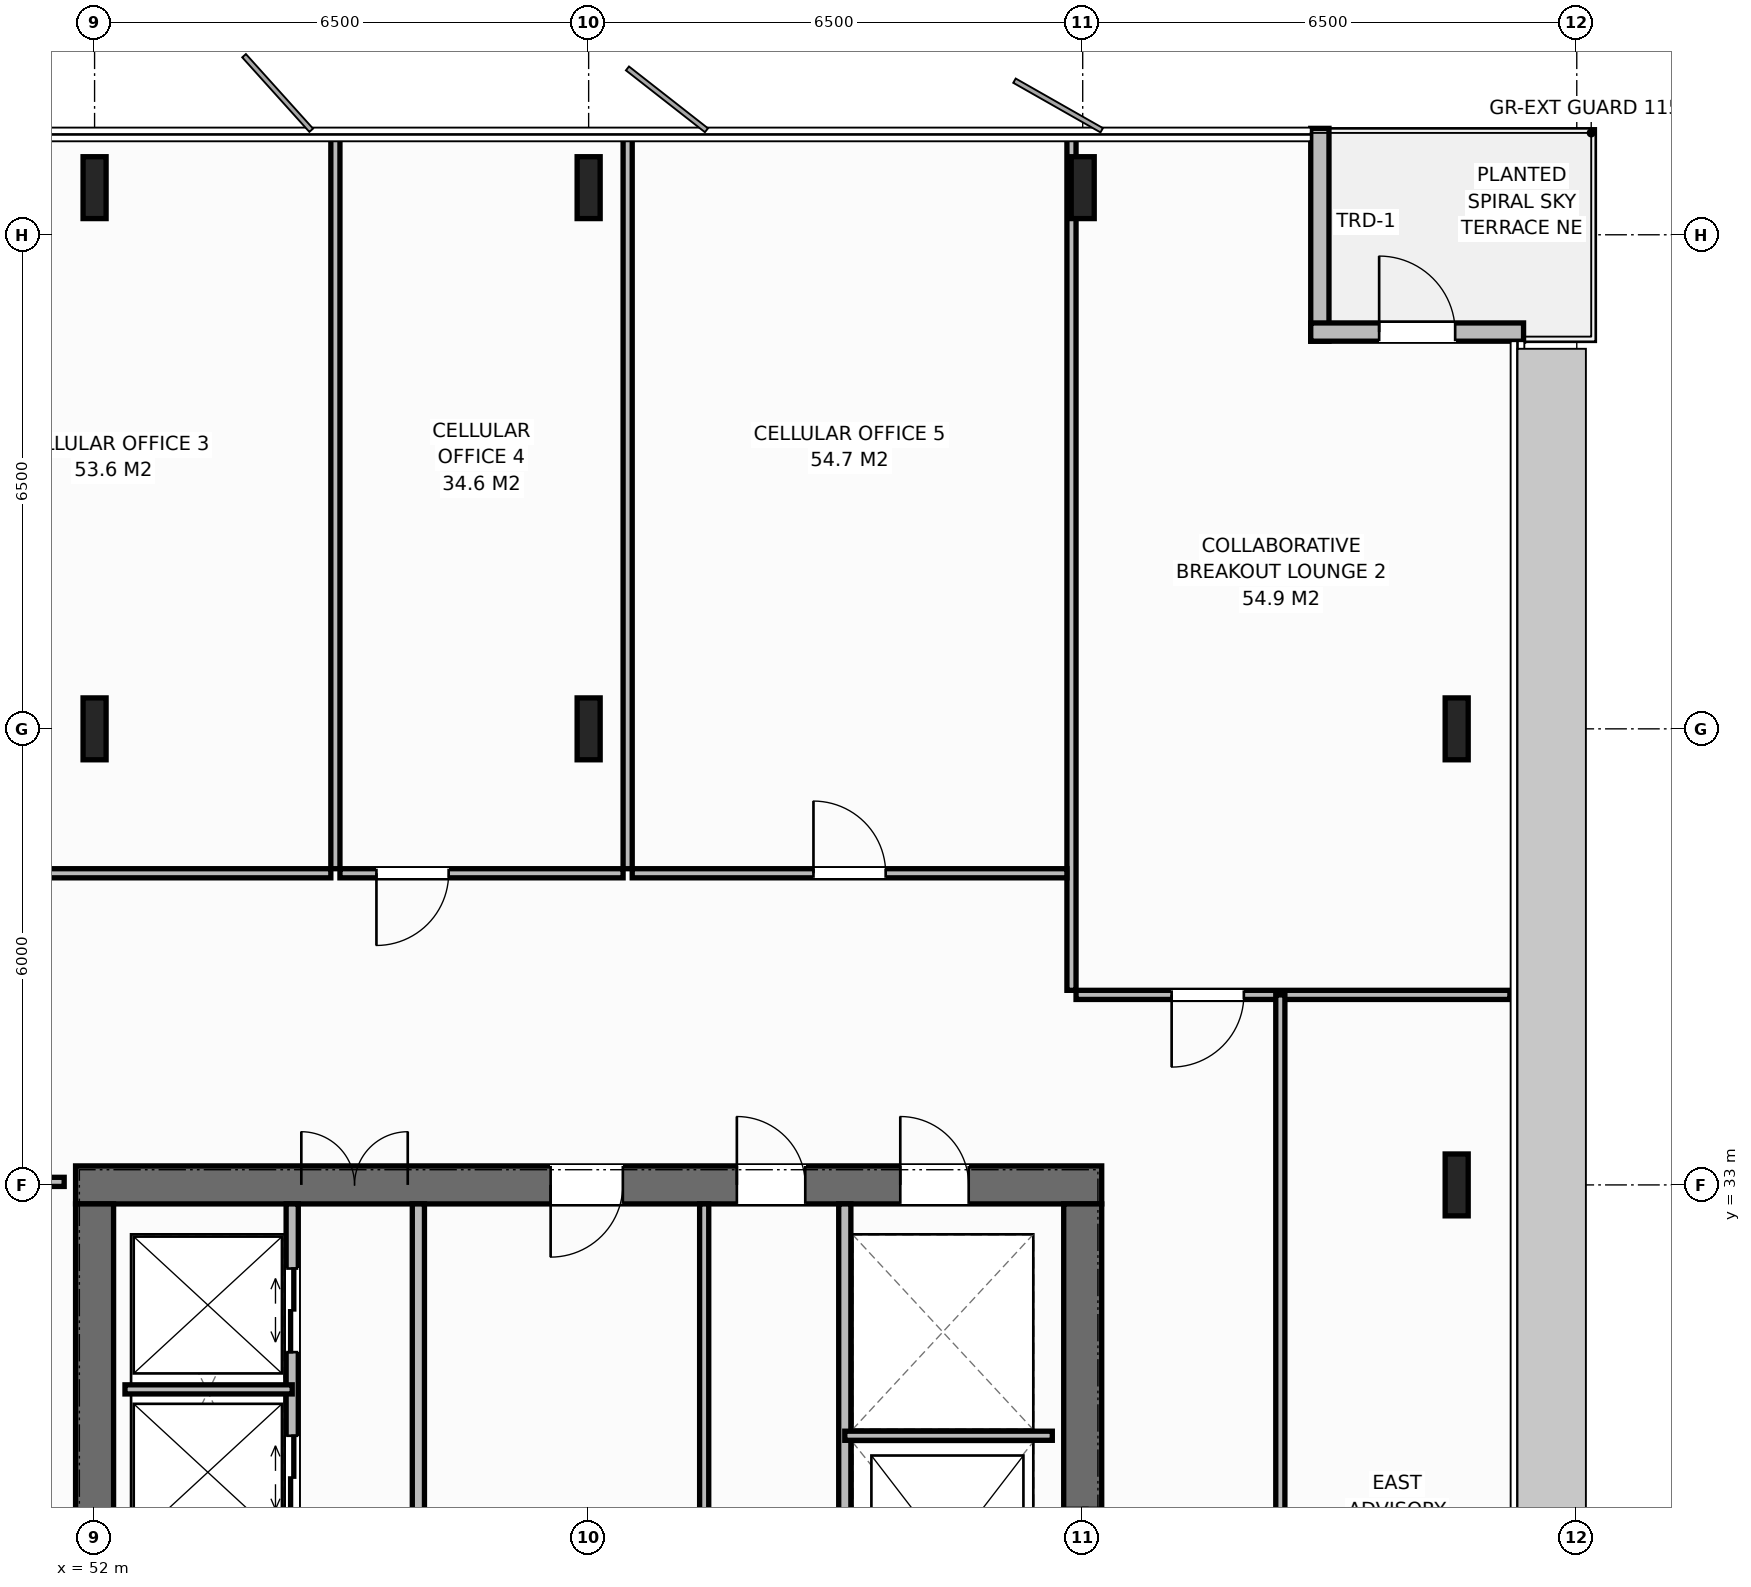
"""IFC4 building model, lengths in metres.
Left out: names, types, materials, properties, quantities, classifications, styles, units other than length and angle.
Written with IfcOpenShell. Run it as: python <this file> out.ifc"""

import sys

from ifc_helpers import new_model, si_unit, direction, frame, frame_2d, origin, origin_2d, place, context, subcontext, project, spatial, rectangle, i_section, extrude, element, fill, save


model = new_model("IFC4")
c1 = context("Model", 3, precision=1e-05, world=origin(), true_north=direction((0.0, 1.0)))
c2 = subcontext(c1, "Body", "Model", "MODEL_VIEW")
j1 = project(units=[si_unit("LENGTHUNIT", "METRE"), si_unit("PLANEANGLEUNIT", "RADIAN")], contexts=[c1])
p1 = place(None, origin())
s1 = spatial("IfcSite", under=j1, at=p1, CompositionType="ELEMENT")
p2 = place(p1, origin())
s2 = spatial("IfcBuilding", under=s1, at=p2, CompositionType="ELEMENT")
p3 = place(p2, frame((0.0, 0.0, 255.6)))
s3 = spatial("IfcBuildingStorey", under=s2, at=p3, CompositionType="ELEMENT", Elevation=255.6)
p4 = place(p3, frame((51.75, 33.0, 0.0), z_axis=(0.0, 0.0, 1.0), x_axis=(1.0, 0.0, 0.0)))
e1 = element("IfcWall", 1, at=p4, inside=s3, PredefinedType="SHEAR", context=c2, shape_type="SweptSolid", body=[
    extrude(rectangle(XDim=13.5, YDim=0.5, at=frame_2d((6.75, 0.0))), origin(), (0.0, 0.0, 1.0), 3.8),
])
p5 = place(p4, frame((2.97, 0.0, 0.0)))
e2 = element("IfcOpeningElement", 2, at=p5, cuts=e1, PredefinedType="OPENING", context=c2, shape_type="SweptSolid", body=[
    extrude(rectangle(XDim=1.4, YDim=2.2, at=frame_2d((0.7, 1.1))), frame((0.0, 0.26, 0.0), z_axis=(0.0, -1.0, 0.0), x_axis=(1.0, 0.0, 0.0)), (0.0, 0.0, 1.0), 0.52),
])
p6 = place(p4, frame((10.85, 0.0, 0.0)))
e3 = element("IfcOpeningElement", 3, at=p6, cuts=e1, PredefinedType="OPENING", context=c2, shape_type="SweptSolid", body=[
    extrude(rectangle(XDim=0.9, YDim=2.15, at=frame_2d((0.45, 1.075))), frame((0.0, 0.26, 0.0), z_axis=(0.0, -1.0, 0.0), x_axis=(1.0, 0.0, 0.0)), (0.0, 0.0, 1.0), 0.52),
])
p7 = place(p4, frame((6.25, 0.0, 0.0)))
e4 = element("IfcOpeningElement", 4, at=p7, cuts=e1, PredefinedType="OPENING", context=c2, shape_type="SweptSolid", body=[
    extrude(rectangle(XDim=0.95, YDim=2.15, at=frame_2d((0.475, 1.075))), frame((0.0, 0.26, 0.0), z_axis=(0.0, -1.0, 0.0), x_axis=(1.0, 0.0, 0.0)), (0.0, 0.0, 1.0), 0.52),
])
p8 = place(p4, frame((8.7, 0.0, 0.0)))
e5 = element("IfcOpeningElement", 5, at=p8, cuts=e1, PredefinedType="OPENING", context=c2, shape_type="SweptSolid", body=[
    extrude(rectangle(XDim=0.9, YDim=2.15, at=frame_2d((0.45, 1.075))), frame((0.0, 0.26, 0.0), z_axis=(0.0, -1.0, 0.0), x_axis=(1.0, 0.0, 0.0)), (0.0, 0.0, 1.0), 0.52),
])
p9 = place(p3, frame((52.0, 19.25, 0.0), z_axis=(0.0, 0.0, 1.0), x_axis=(0.0, 1.0, 0.0)))
e6 = element("IfcWall", 6, at=p9, inside=s3, PredefinedType="SHEAR", context=c2, shape_type="SweptSolid", body=[
    extrude(rectangle(XDim=13.5, YDim=0.5, at=frame_2d((6.75, 0.0))), origin(), (0.0, 0.0, 1.0), 3.8),
])
p10 = place(p3, frame((65.0, 19.25, 0.0), z_axis=(0.0, 0.0, 1.0), x_axis=(0.0, 1.0, 0.0)))
e7 = element("IfcWall", 7, at=p10, inside=s3, PredefinedType="SHEAR", context=c2, shape_type="SweptSolid", body=[
    extrude(rectangle(XDim=13.5, YDim=0.5, at=frame_2d((6.75, 0.0))), origin(), (0.0, 0.0, 1.0), 3.8),
])
p11 = place(p10, frame((8.2, 0.0, 0.0)))
e8 = element("IfcOpeningElement", 8, at=p11, cuts=e7, PredefinedType="OPENING", context=c2, shape_type="SweptSolid", body=[
    extrude(rectangle(XDim=1.3, YDim=2.2, at=frame_2d((0.65, 1.1))), frame((0.0, 0.26, 0.0), z_axis=(0.0, -1.0, 0.0), x_axis=(1.0, 0.0, 0.0)), (0.0, 0.0, 1.0), 0.52),
])
for number, where, z_axis, x_axis in (
    (9, (58.5, 39.0, 0.0), (0.0, 0.0, 1.0), (1.0, 0.0, 0.0)),
    (10, (52.0, 39.0, 0.0), (0.0, 0.0, 1.0), (1.0, 0.0, 0.0)),
    (11, (52.0, 46.12, 0.0), (0.0, 0.0, 1.0), (1.0, 0.0, 0.0)),
    (12, (58.5, 46.12, 0.0), (0.0, 0.0, 1.0), (1.0, 0.0, 0.0)),
    (13, (65.0, 46.12, 0.0), (0.0, 0.0, 1.0), (1.0, 0.0, 0.0)),
    (14, (69.92, 33.0, 0.0), (0.0, 0.0, 1.0), (1.0, 0.0, 0.0)),
    (15, (69.92, 39.0, 0.0), (0.0, 0.0, 1.0), (1.0, 0.0, 0.0)),
):
    element("IfcColumn", number, at=place(p3, frame(where, z_axis=z_axis, x_axis=x_axis)), inside=s3, PredefinedType="COLUMN", context=c2, shape_type="SweptSolid", body=[
        extrude(i_section(OverallWidth=0.303, OverallDepth=0.814, WebThickness=0.021, FlangeThickness=0.04, at=origin_2d()), origin(), (0.0, 0.0, 1.0), 3.8),
    ])
p12 = place(p3, frame((68.12, 46.9, 0.0), z_axis=(0.0, 0.0, 1.0), x_axis=(0.0, -1.0, 0.0)))
e16 = element("IfcWall", 16, at=p12, inside=s3, PredefinedType="STANDARD", context=c2, shape_type="SweptSolid", body=[
    extrude(rectangle(XDim=2.8, YDim=0.24, at=frame_2d((1.4, 0.0))), origin(), (0.0, 0.0, 1.0), 3.588),
])
p13 = place(p3, frame((68.0, 44.22, 0.0), z_axis=(0.0, 0.0, 1.0), x_axis=(1.0, 0.0, 0.0)))
e17 = element("IfcWall", 17, at=p13, inside=s3, PredefinedType="STANDARD", context=c2, shape_type="SweptSolid", body=[
    extrude(rectangle(XDim=2.8, YDim=0.24, at=frame_2d((1.4, 0.0))), origin(), (0.0, 0.0, 1.0), 3.588),
])
p14 = place(p13, frame((0.9, 0.0, 0.0)))
e18 = element("IfcOpeningElement", 18, at=p14, cuts=e17, PredefinedType="OPENING", context=c2, shape_type="SweptSolid", body=[
    extrude(rectangle(XDim=1.0, YDim=2.2, at=frame_2d((0.5, 1.1))), frame((0.0, 0.13, 0.0), z_axis=(0.0, -1.0, 0.0), x_axis=(1.0, 0.0, 0.0)), (0.0, 0.0, 1.0), 0.26),
])
p15 = place(p3, frame((54.6, 19.25, 0.0), z_axis=(0.0, 0.0, 1.0), x_axis=(0.0, 1.0, 0.0)))
e19 = element("IfcWall", 19, at=p15, inside=s3, PredefinedType="STANDARD", context=c2, shape_type="SweptSolid", body=[
    extrude(rectangle(XDim=13.5, YDim=0.16, at=frame_2d((6.75, 0.0))), origin(), (0.0, 0.0, 1.0), 3.588),
])
p16 = place(p15, frame((2.15, 0.0, 0.0)))
e20 = element("IfcOpeningElement", 20, at=p16, cuts=e19, PredefinedType="OPENING", context=c2, shape_type="SweptSolid", body=[
    extrude(rectangle(XDim=0.95, YDim=2.15, at=frame_2d((0.475, 1.075))), frame((0.0, 0.09, 0.0), z_axis=(0.0, -1.0, 0.0), x_axis=(1.0, 0.0, 0.0)), (0.0, 0.0, 1.0), 0.18),
])
p17 = place(p15, frame((6.25, 0.0, 0.0)))
e21 = element("IfcOpeningElement", 21, at=p17, cuts=e19, PredefinedType="OPENING", context=c2, shape_type="SweptSolid", body=[
    extrude(rectangle(XDim=0.95, YDim=2.15, at=frame_2d((0.475, 1.075))), frame((0.0, 0.09, 0.0), z_axis=(0.0, -1.0, 0.0), x_axis=(1.0, 0.0, 0.0)), (0.0, 0.0, 1.0), 0.18),
])
p18 = place(p15, frame((9.35, 0.0, 0.0)))
e22 = element("IfcOpeningElement", 22, at=p18, cuts=e19, PredefinedType="OPENING", context=c2, shape_type="SweptSolid", body=[
    extrude(rectangle(XDim=1.1, YDim=2.2, at=frame_2d((0.55, 1.1))), frame((0.0, 0.09, 0.0), z_axis=(0.0, -1.0, 0.0), x_axis=(1.0, 0.0, 0.0)), (0.0, 0.0, 1.0), 0.18),
])
p19 = place(p15, frame((11.55, 0.0, 0.0)))
e23 = element("IfcOpeningElement", 23, at=p19, cuts=e19, PredefinedType="OPENING", context=c2, shape_type="SweptSolid", body=[
    extrude(rectangle(XDim=1.1, YDim=2.2, at=frame_2d((0.55, 1.1))), frame((0.0, 0.09, 0.0), z_axis=(0.0, -1.0, 0.0), x_axis=(1.0, 0.0, 0.0)), (0.0, 0.0, 1.0), 0.18),
])
p20 = place(p3, frame((56.26, 23.09, 0.0), z_axis=(0.0, 0.0, 1.0), x_axis=(0.0, 1.0, 0.0)))
e24 = element("IfcWall", 24, at=p20, inside=s3, PredefinedType="STANDARD", context=c2, shape_type="SweptSolid", body=[
    extrude(rectangle(XDim=9.66, YDim=0.16, at=frame_2d((4.83, 0.0))), origin(), (0.0, 0.0, 1.0), 3.588),
])
p21 = place(p20, frame((1.01, 0.0, 0.0)))
e25 = element("IfcOpeningElement", 25, at=p21, cuts=e24, PredefinedType="OPENING", context=c2, shape_type="SweptSolid", body=[
    extrude(rectangle(XDim=1.3, YDim=2.2, at=frame_2d((0.65, 1.1))), frame((0.0, 0.09, 0.0), z_axis=(0.0, -1.0, 0.0), x_axis=(1.0, 0.0, 0.0)), (0.0, 0.0, 1.0), 0.18),
])
p22 = place(p3, frame((52.4, 30.31, 0.0), z_axis=(0.0, 0.0, 1.0), x_axis=(1.0, 0.0, 0.0)))
e26 = element("IfcWall", 26, at=p22, inside=s3, PredefinedType="PARTITIONING", context=c2, shape_type="SweptSolid", body=[
    extrude(rectangle(XDim=2.2, YDim=0.12, at=frame_2d((1.1, 0.0))), origin(), (0.0, 0.0, 1.0), 3.588),
])
p23 = place(p3, frame((61.87, 26.56, 0.0), z_axis=(0.0, 0.0, 1.0), x_axis=(0.0, 1.0, 0.0)))
e27 = element("IfcWall", 27, at=p23, inside=s3, PredefinedType="STANDARD", context=c2, shape_type="SweptSolid", body=[
    extrude(rectangle(XDim=6.19, YDim=0.16, at=frame_2d((3.095, 0.0))), origin(), (0.0, 0.0, 1.0), 3.588),
])
p24 = place(p3, frame((61.87, 29.7, 0.0), z_axis=(0.0, 0.0, 1.0), x_axis=(1.0, 0.0, 0.0)))
e28 = element("IfcWall", 28, at=p24, inside=s3, PredefinedType="PARTITIONING", context=c2, shape_type="SweptSolid", body=[
    extrude(rectangle(XDim=2.73, YDim=0.12, at=frame_2d((1.365, 0.0))), origin(), (0.0, 0.0, 1.0), 3.588),
])
p25 = place(p3, frame((60.02, 26.56, 0.0), z_axis=(0.0, 0.0, 1.0), x_axis=(0.0, 1.0, 0.0)))
e29 = element("IfcWall", 29, at=p25, inside=s3, PredefinedType="PARTITIONING", context=c2, shape_type="SweptSolid", body=[
    extrude(rectangle(XDim=6.19, YDim=0.12, at=frame_2d((3.095, 0.0))), origin(), (0.0, 0.0, 1.0), 3.588),
])
p26 = place(p3, frame((48.0, 33.04, 0.0), z_axis=(0.0, 0.0, 1.0), x_axis=(1.0, 0.0, 0.0)))
e30 = element("IfcWall", 30, at=p26, inside=s3, PredefinedType="PARTITIONING", context=c2, shape_type="SweptSolid", body=[
    extrude(rectangle(XDim=3.6, YDim=0.12, at=frame_2d((1.8, 0.0))), origin(), (0.0, 0.0, 1.0), 3.328),
])
p27 = place(p26, frame((1.1, 0.0, 0.0)))
e31 = element("IfcOpeningElement", 31, at=p27, cuts=e30, PredefinedType="OPENING", context=c2, shape_type="SweptSolid", body=[
    extrude(rectangle(XDim=0.95, YDim=2.15, at=frame_2d((0.475, 1.075))), frame((0.0, 0.07, 0.0), z_axis=(0.0, -1.0, 0.0), x_axis=(1.0, 0.0, 0.0)), (0.0, 0.0, 1.0), 0.14),
])
p28 = place(p3, frame((55.168, 37.16, 0.0), z_axis=(0.0, 0.0, 1.0), x_axis=(0.0, 1.0, 0.0)))
e32 = element("IfcWall", 32, at=p28, inside=s3, PredefinedType="PARTITIONING", context=c2, shape_type="SweptSolid", body=[
    extrude(rectangle(XDim=9.72, YDim=0.12, at=frame_2d((4.86, 0.0))), origin(), (0.0, 0.0, 1.0), 3.588),
])
p29 = place(p3, frame((49.389, 37.1, 0.0), z_axis=(0.0, 0.0, 1.0), x_axis=(1.0, 0.0, 0.0)))
e33 = element("IfcWall", 33, at=p29, inside=s3, PredefinedType="PARTITIONING", context=c2, shape_type="SweptSolid", body=[
    extrude(rectangle(XDim=5.719, YDim=0.12, at=frame_2d((2.859, 0.0))), origin(), (0.0, 0.0, 1.0), 3.588),
])
p30 = place(p29, frame((0.48, 0.0, 0.0)))
e34 = element("IfcOpeningElement", 34, at=p30, cuts=e33, PredefinedType="OPENING", context=c2, shape_type="SweptSolid", body=[
    extrude(rectangle(XDim=0.95, YDim=2.15, at=frame_2d((0.475, 1.075))), frame((0.0, 0.07, 0.0), z_axis=(0.0, -1.0, 0.0), x_axis=(1.0, 0.0, 0.0)), (0.0, 0.0, 1.0), 0.14),
])
p31 = place(p3, frame((59.013, 37.16, 0.0), z_axis=(0.0, 0.0, 1.0), x_axis=(0.0, 1.0, 0.0)))
e35 = element("IfcWall", 35, at=p31, inside=s3, PredefinedType="PARTITIONING", context=c2, shape_type="SweptSolid", body=[
    extrude(rectangle(XDim=9.72, YDim=0.12, at=frame_2d((4.86, 0.0))), origin(), (0.0, 0.0, 1.0), 3.588),
])
p32 = place(p3, frame((55.228, 37.1, 0.0), z_axis=(0.0, 0.0, 1.0), x_axis=(1.0, 0.0, 0.0)))
e36 = element("IfcWall", 36, at=p32, inside=s3, PredefinedType="PARTITIONING", context=c2, shape_type="SweptSolid", body=[
    extrude(rectangle(XDim=3.725, YDim=0.12, at=frame_2d((1.863, 0.0))), origin(), (0.0, 0.0, 1.0), 3.588),
])
p33 = place(p32, frame((0.48, 0.0, 0.0)))
e37 = element("IfcOpeningElement", 37, at=p33, cuts=e36, PredefinedType="OPENING", context=c2, shape_type="SweptSolid", body=[
    extrude(rectangle(XDim=0.95, YDim=2.15, at=frame_2d((0.475, 1.075))), frame((0.0, 0.07, 0.0), z_axis=(0.0, -1.0, 0.0), x_axis=(1.0, 0.0, 0.0)), (0.0, 0.0, 1.0), 0.14),
])
p34 = place(p3, frame((64.852, 35.56, 0.0), z_axis=(0.0, 0.0, 1.0), x_axis=(0.0, 1.0, 0.0)))
e38 = element("IfcWall", 38, at=p34, inside=s3, PredefinedType="PARTITIONING", context=c2, shape_type="SweptSolid", body=[
    extrude(rectangle(XDim=11.32, YDim=0.12, at=frame_2d((5.66, 0.0))), origin(), (0.0, 0.0, 1.0), 2.788),
])
p35 = place(p3, frame((59.073, 37.1, 0.0), z_axis=(0.0, 0.0, 1.0), x_axis=(1.0, 0.0, 0.0)))
e39 = element("IfcWall", 39, at=p35, inside=s3, PredefinedType="PARTITIONING", context=c2, shape_type="SweptSolid", body=[
    extrude(rectangle(XDim=5.719, YDim=0.12, at=frame_2d((2.859, 0.0))), origin(), (0.0, 0.0, 1.0), 3.588),
])
p36 = place(p35, frame((2.385, 0.0, 0.0)))
e40 = element("IfcOpeningElement", 40, at=p36, cuts=e39, PredefinedType="OPENING", context=c2, shape_type="SweptSolid", body=[
    extrude(rectangle(XDim=0.95, YDim=2.15, at=frame_2d((0.475, 1.075))), frame((0.0, 0.07, 0.0), z_axis=(0.0, -1.0, 0.0), x_axis=(1.0, 0.0, 0.0)), (0.0, 0.0, 1.0), 0.14),
])
p37 = place(p3, frame((64.912, 35.5, 0.0), z_axis=(0.0, 0.0, 1.0), x_axis=(1.0, 0.0, 0.0)))
e41 = element("IfcWall", 41, at=p37, inside=s3, PredefinedType="PARTITIONING", context=c2, shape_type="SweptSolid", body=[
    extrude(rectangle(XDim=5.708, YDim=0.12, at=frame_2d((2.854, 0.0))), origin(), (0.0, 0.0, 1.0), 3.588),
])
p38 = place(p37, frame((1.258, 0.0, 0.0)))
e42 = element("IfcOpeningElement", 42, at=p38, cuts=e41, PredefinedType="OPENING", context=c2, shape_type="SweptSolid", body=[
    extrude(rectangle(XDim=0.95, YDim=2.15, at=frame_2d((0.475, 1.075))), frame((0.0, 0.07, 0.0), z_axis=(0.0, -1.0, 0.0), x_axis=(1.0, 0.0, 0.0)), (0.0, 0.0, 1.0), 0.14),
])
p39 = place(p3, frame((67.6, 16.5, 0.0), z_axis=(0.0, 0.0, 1.0), x_axis=(0.0, 1.0, 0.0)))
e43 = element("IfcWall", 43, at=p39, inside=s3, PredefinedType="PARTITIONING", context=c2, shape_type="SweptSolid", body=[
    extrude(rectangle(XDim=19.0, YDim=0.12, at=frame_2d((9.5, 0.0))), origin(), (0.0, 0.0, 1.0), 3.588),
])
p40 = place(p39, frame((9.025, 0.0, 0.0)))
e44 = element("IfcOpeningElement", 44, at=p40, cuts=e43, PredefinedType="OPENING", context=c2, shape_type="SweptSolid", body=[
    extrude(rectangle(XDim=0.95, YDim=2.15, at=frame_2d((0.475, 1.075))), frame((0.0, 0.07, 0.0), z_axis=(0.0, -1.0, 0.0), x_axis=(1.0, 0.0, 0.0)), (0.0, 0.0, 1.0), 0.14),
])
p41 = place(p14, origin())
e45 = element("IfcDoor", 45, at=p41, inside=s3, OperationType="SINGLE_SWING_LEFT", PredefinedType="DOOR", context=c2, shape_type="SweptSolid", body=[
    extrude(rectangle(XDim=1.0, YDim=2.2, at=frame_2d((0.5, 1.1))), frame((0.0, 0.025, 0.0), z_axis=(0.0, -1.0, 0.0), x_axis=(1.0, 0.0, 0.0)), (0.0, 0.0, 1.0), 0.05),
])
fill(e18, e45)
p42 = place(p5, origin())
e46 = element("IfcDoor", 46, at=p42, inside=s3, OperationType="DOUBLE_DOOR_SINGLE_SWING", PredefinedType="DOOR", context=c2, shape_type="SweptSolid", body=[
    extrude(rectangle(XDim=1.4, YDim=2.2, at=frame_2d((0.7, 1.1))), frame((0.0, -0.025, 0.0), z_axis=(0.0, -1.0, 0.0), x_axis=(1.0, 0.0, 0.0)), (0.0, 0.0, 1.0), 0.05),
])
fill(e2, e46)
p43 = place(p18, origin())
e47 = element("IfcDoor", 47, at=p43, inside=s3, OperationType="DOUBLE_DOOR_SLIDING", PredefinedType="DOOR", context=c2, shape_type="SweptSolid", body=[
    extrude(rectangle(XDim=1.1, YDim=2.2, at=frame_2d((0.55, 1.1))), frame((0.0, 0.025, 0.0), z_axis=(0.0, -1.0, 0.0), x_axis=(1.0, 0.0, 0.0)), (0.0, 0.0, 1.0), 0.05),
])
fill(e22, e47)
p44 = place(p19, origin())
e48 = element("IfcDoor", 48, at=p44, inside=s3, OperationType="DOUBLE_DOOR_SLIDING", PredefinedType="DOOR", context=c2, shape_type="SweptSolid", body=[
    extrude(rectangle(XDim=1.1, YDim=2.2, at=frame_2d((0.55, 1.1))), frame((0.0, 0.025, 0.0), z_axis=(0.0, -1.0, 0.0), x_axis=(1.0, 0.0, 0.0)), (0.0, 0.0, 1.0), 0.05),
])
fill(e23, e48)
p45 = place(p6, origin())
e49 = element("IfcDoor", 49, at=p45, inside=s3, OperationType="SINGLE_SWING_LEFT", PredefinedType="DOOR", context=c2, shape_type="SweptSolid", body=[
    extrude(rectangle(XDim=0.9, YDim=2.15, at=frame_2d((0.45, 1.075))), frame((0.0, -0.025, 0.0), z_axis=(0.0, -1.0, 0.0), x_axis=(1.0, 0.0, 0.0)), (0.0, 0.0, 1.0), 0.05),
])
fill(e3, e49)
p46 = place(p7, origin())
e50 = element("IfcDoor", 50, at=p46, inside=s3, OperationType="SINGLE_SWING_RIGHT", PredefinedType="DOOR", context=c2, shape_type="SweptSolid", body=[
    extrude(rectangle(XDim=0.95, YDim=2.15, at=frame_2d((0.475, 1.075))), frame((0.0, -0.025, 0.0), z_axis=(0.0, -1.0, 0.0), x_axis=(1.0, 0.0, 0.0)), (0.0, 0.0, 1.0), 0.05),
])
fill(e4, e50)
p47 = place(p8, origin())
e51 = element("IfcDoor", 51, at=p47, inside=s3, OperationType="SINGLE_SWING_LEFT", PredefinedType="DOOR", context=c2, shape_type="SweptSolid", body=[
    extrude(rectangle(XDim=0.9, YDim=2.15, at=frame_2d((0.45, 1.075))), frame((0.0, -0.025, 0.0), z_axis=(0.0, -1.0, 0.0), x_axis=(1.0, 0.0, 0.0)), (0.0, 0.0, 1.0), 0.05),
])
fill(e5, e51)
p48 = place(p33, origin())
e52 = element("IfcDoor", 52, at=p48, inside=s3, OperationType="SINGLE_SWING_RIGHT", PredefinedType="DOOR", context=c2, shape_type="SweptSolid", body=[
    extrude(rectangle(XDim=0.95, YDim=2.15, at=frame_2d((0.475, 1.075))), frame((0.0, 0.025, 0.0), z_axis=(0.0, -1.0, 0.0), x_axis=(1.0, 0.0, 0.0)), (0.0, 0.0, 1.0), 0.05),
])
fill(e37, e52)
p49 = place(p36, origin())
e53 = element("IfcDoor", 53, at=p49, inside=s3, OperationType="SINGLE_SWING_LEFT", PredefinedType="DOOR", context=c2, shape_type="SweptSolid", body=[
    extrude(rectangle(XDim=0.95, YDim=2.15, at=frame_2d((0.475, 1.075))), frame((0.0, 0.025, 0.0), z_axis=(0.0, -1.0, 0.0), x_axis=(1.0, 0.0, 0.0)), (0.0, 0.0, 1.0), 0.05),
])
fill(e40, e53)
p50 = place(p38, origin())
e54 = element("IfcDoor", 54, at=p50, inside=s3, OperationType="SINGLE_SWING_RIGHT", PredefinedType="DOOR", context=c2, shape_type="SweptSolid", body=[
    extrude(rectangle(XDim=0.95, YDim=2.15, at=frame_2d((0.475, 1.075))), frame((0.0, 0.025, 0.0), z_axis=(0.0, -1.0, 0.0), x_axis=(1.0, 0.0, 0.0)), (0.0, 0.0, 1.0), 0.05),
])
fill(e42, e54)
save(model, sys.argv[1])
